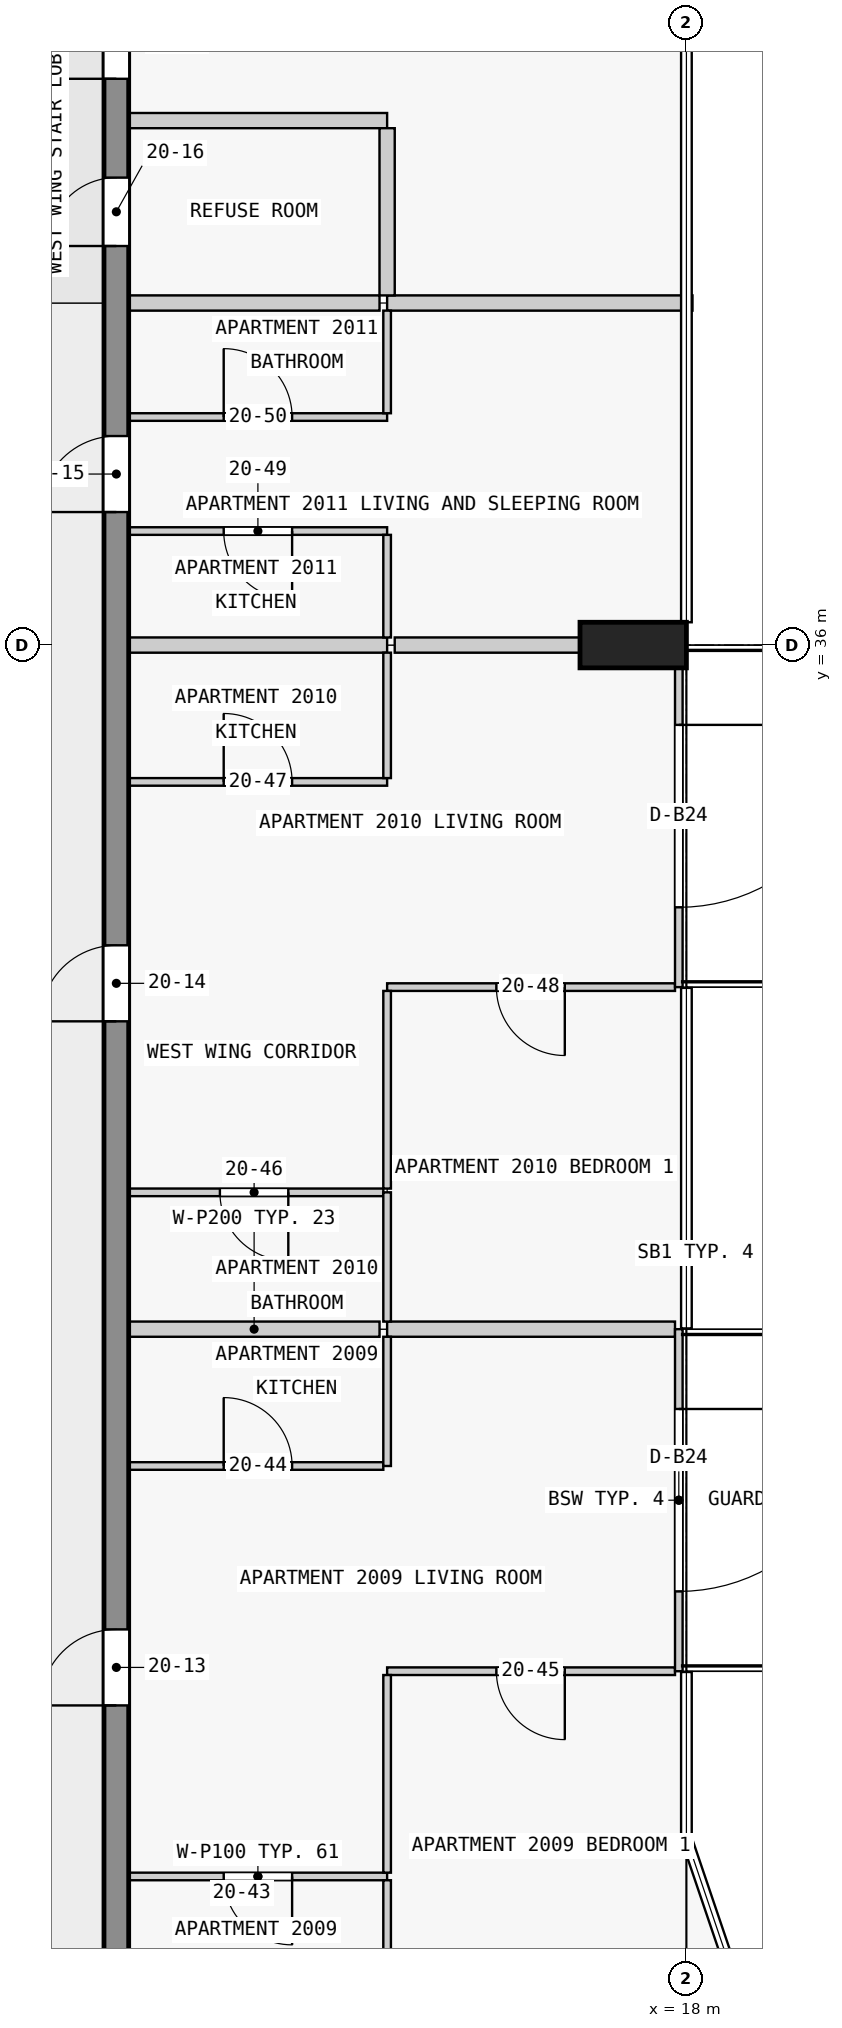
"""IFC4 building model, lengths in metres.
Left out: names, types, materials, properties, quantities, classifications, styles, units other than length and angle.
Written with IfcOpenShell. Run it as: python <this file> out.ifc"""

import sys

from ifc_helpers import new_model, si_unit, direction, frame, frame_2d, origin, origin_2d, place, context, subcontext, project, spatial, rectangle, extrude, element, fill, save


model = new_model("IFC4")
c1 = context("Model", 3, precision=1e-05, world=origin(), true_north=direction((0.0, 1.0)))
c2 = subcontext(c1, "Body", "Model", "MODEL_VIEW")
j1 = project(units=[si_unit("LENGTHUNIT", "METRE"), si_unit("PLANEANGLEUNIT", "RADIAN")], contexts=[c1])
p1 = place(None, origin())
s1 = spatial("IfcSite", under=j1, at=p1, CompositionType="ELEMENT")
p2 = place(p1, origin())
s2 = spatial("IfcBuilding", under=s1, at=p2, CompositionType="ELEMENT")
p3 = place(p2, frame((0.0, 0.0, 81.8)))
s3 = spatial("IfcBuildingStorey", under=s2, at=p3, CompositionType="ELEMENT", Elevation=81.8)
p4 = place(p3, frame((17.3, 36.0, 0.0), z_axis=(0.0, 0.0, 1.0), x_axis=(0.0, 1.0, 0.0)))
e1 = element("IfcColumn", 1, at=p4, inside=s3, PredefinedType="COLUMN", context=c2, shape_type="SweptSolid", body=[
    extrude(rectangle(XDim=0.6, YDim=1.4, at=origin_2d()), origin(), (0.0, 0.0, 1.0), 3.5),
])
p5 = place(p3, frame((10.5, 18.0, 0.0), z_axis=(0.0, 0.0, 1.0), x_axis=(0.0, 1.0, 0.0)))
e2 = element("IfcWall", 2, at=p5, inside=s3, PredefinedType="SHEAR", context=c2, shape_type="SweptSolid", body=[
    extrude(rectangle(XDim=27.0, YDim=0.325, at=frame_2d((13.5, 0.0))), origin(), (0.0, 0.0, 1.0), 3.25),
])
p6 = place(p5, frame((4.05, 0.0, 0.0)))
e3 = element("IfcOpeningElement", 3, at=p6, cuts=e2, PredefinedType="OPENING", context=c2, shape_type="SweptSolid", body=[
    extrude(rectangle(XDim=1.0, YDim=2.1, at=frame_2d((0.5, 1.05))), frame((0.0, 0.172, 0.0), z_axis=(0.0, -1.0, 0.0), x_axis=(1.0, 0.0, 0.0)), (0.0, 0.0, 1.0), 0.345),
])
p7 = place(p5, frame((13.05, 0.0, 0.0)))
e4 = element("IfcOpeningElement", 4, at=p7, cuts=e2, PredefinedType="OPENING", context=c2, shape_type="SweptSolid", body=[
    extrude(rectangle(XDim=1.0, YDim=2.1, at=frame_2d((0.5, 1.05))), frame((0.0, 0.172, 0.0), z_axis=(0.0, -1.0, 0.0), x_axis=(1.0, 0.0, 0.0)), (0.0, 0.0, 1.0), 0.345),
])
p8 = place(p5, frame((19.75, 0.0, 0.0)))
e5 = element("IfcOpeningElement", 5, at=p8, cuts=e2, PredefinedType="OPENING", context=c2, shape_type="SweptSolid", body=[
    extrude(rectangle(XDim=1.0, YDim=2.1, at=frame_2d((0.5, 1.05))), frame((0.0, 0.172, 0.0), z_axis=(0.0, -1.0, 0.0), x_axis=(1.0, 0.0, 0.0)), (0.0, 0.0, 1.0), 0.345),
])
p9 = place(p5, frame((23.25, 0.0, 0.0)))
e6 = element("IfcOpeningElement", 6, at=p9, cuts=e2, PredefinedType="OPENING", context=c2, shape_type="SweptSolid", body=[
    extrude(rectangle(XDim=0.9, YDim=2.1, at=frame_2d((0.45, 1.05))), frame((0.0, 0.172, 0.0), z_axis=(0.0, -1.0, 0.0), x_axis=(1.0, 0.0, 0.0)), (0.0, 0.0, 1.0), 0.345),
])
p10 = place(p5, frame((25.45, 0.0, 0.0)))
e7 = element("IfcOpeningElement", 7, at=p10, cuts=e2, PredefinedType="OPENING", context=c2, shape_type="SweptSolid", body=[
    extrude(rectangle(XDim=1.0, YDim=2.1, at=frame_2d((0.5, 1.05))), frame((0.0, 0.172, 0.0), z_axis=(0.0, -1.0, 0.0), x_axis=(1.0, 0.0, 0.0)), (0.0, 0.0, 1.0), 0.345),
])
p11 = place(p3, frame((17.9, 27.0, 0.0), z_axis=(0.0, 0.0, 1.0), x_axis=(0.0, -1.0, 0.0)))
e8 = element("IfcWall", 8, at=p11, inside=s3, PredefinedType="STANDARD", context=c2, shape_type="SweptSolid", body=[
    extrude(rectangle(XDim=4.5, YDim=0.1, at=frame_2d((2.25, 0.0))), origin(), (0.0, 0.0, 1.0), 3.25),
])
p12 = place(p11, frame((1.05, 0.0, 0.0)))
e9 = element("IfcOpeningElement", 9, at=p12, cuts=e8, PredefinedType="OPENING", context=c2, shape_type="SweptSolid", body=[
    extrude(rectangle(XDim=2.4, YDim=2.4, at=frame_2d((1.2, 1.2))), frame((0.0, 0.06, 0.0), z_axis=(0.0, -1.0, 0.0), x_axis=(1.0, 0.0, 0.0)), (0.0, 0.0, 1.0), 0.12),
])
p13 = place(p3, frame((17.9, 36.0, 0.0), z_axis=(0.0, 0.0, 1.0), x_axis=(0.0, -1.0, 0.0)))
e10 = element("IfcWall", 10, at=p13, inside=s3, PredefinedType="STANDARD", context=c2, shape_type="SweptSolid", body=[
    extrude(rectangle(XDim=4.5, YDim=0.1, at=frame_2d((2.25, 0.0))), origin(), (0.0, 0.0, 1.0), 3.25),
])
p14 = place(p13, frame((1.05, 0.0, 0.0)))
e11 = element("IfcOpeningElement", 11, at=p14, cuts=e10, PredefinedType="OPENING", context=c2, shape_type="SweptSolid", body=[
    extrude(rectangle(XDim=2.4, YDim=2.4, at=frame_2d((1.2, 1.2))), frame((0.0, 0.06, 0.0), z_axis=(0.0, -1.0, 0.0), x_axis=(1.0, 0.0, 0.0)), (0.0, 0.0, 1.0), 0.12),
])
p15 = place(p3, frame((14.062, 19.8, 0.0), z_axis=(0.0, 0.0, 1.0), x_axis=(-1.0, 0.0, 0.0)))
e12 = element("IfcWall", 12, at=p15, inside=s3, PredefinedType="PARTITIONING", context=c2, shape_type="SweptSolid", body=[
    extrude(rectangle(XDim=3.4, YDim=0.1, at=frame_2d((1.7, 0.0))), origin(), (0.0, 0.0, 1.0), 3.25),
])
p16 = place(p15, frame((1.25, 0.0, 0.0)))
e13 = element("IfcOpeningElement", 13, at=p16, cuts=e12, PredefinedType="OPENING", context=c2, shape_type="SweptSolid", body=[
    extrude(rectangle(XDim=0.9, YDim=2.1, at=frame_2d((0.45, 1.05))), frame((0.0, 0.06, 0.0), z_axis=(0.0, -1.0, 0.0), x_axis=(1.0, 0.0, 0.0)), (0.0, 0.0, 1.0), 0.12),
])
p17 = place(p3, frame((17.85, 22.5, 0.0), z_axis=(0.0, 0.0, 1.0), x_axis=(-1.0, 0.0, 0.0)))
e14 = element("IfcWall", 14, at=p17, inside=s3, PredefinedType="PARTITIONING", context=c2, shape_type="SweptSolid", body=[
    extrude(rectangle(XDim=3.788, YDim=0.1, at=frame_2d((1.894, 0.0))), origin(), (0.0, 0.0, 1.0), 3.25),
])
p18 = place(p17, frame((1.45, 0.0, 0.0)))
e15 = element("IfcOpeningElement", 15, at=p18, cuts=e14, PredefinedType="OPENING", context=c2, shape_type="SweptSolid", body=[
    extrude(rectangle(XDim=0.9, YDim=2.1, at=frame_2d((0.45, 1.05))), frame((0.0, 0.06, 0.0), z_axis=(0.0, -1.0, 0.0), x_axis=(1.0, 0.0, 0.0)), (0.0, 0.0, 1.0), 0.12),
])
p19 = place(p3, frame((10.663, 25.2, 0.0), z_axis=(0.0, 0.0, 1.0), x_axis=(1.0, 0.0, 0.0)))
e16 = element("IfcWall", 16, at=p19, inside=s3, PredefinedType="PARTITIONING", context=c2, shape_type="SweptSolid", body=[
    extrude(rectangle(XDim=3.35, YDim=0.1, at=frame_2d((1.675, 0.0))), origin(), (0.0, 0.0, 1.0), 3.25),
])
p20 = place(p19, frame((1.25, 0.0, 0.0)))
e17 = element("IfcOpeningElement", 17, at=p20, cuts=e16, PredefinedType="OPENING", context=c2, shape_type="SweptSolid", body=[
    extrude(rectangle(XDim=0.9, YDim=2.1, at=frame_2d((0.45, 1.05))), frame((0.0, 0.06, 0.0), z_axis=(0.0, -1.0, 0.0), x_axis=(1.0, 0.0, 0.0)), (0.0, 0.0, 1.0), 0.12),
])
p21 = place(p3, frame((13.962, 27.0, 0.0), z_axis=(0.0, 0.0, 1.0), x_axis=(-1.0, 0.0, 0.0)))
e18 = element("IfcWall", 18, at=p21, inside=s3, PredefinedType="PARTITIONING", context=c2, shape_type="SweptSolid", body=[
    extrude(rectangle(XDim=3.3, YDim=0.2, at=frame_2d((1.65, 0.0))), origin(), (0.0, 0.0, 1.0), 3.25),
])
p22 = place(p3, frame((14.062, 27.0, 0.0), z_axis=(0.0, 0.0, 1.0), x_axis=(1.0, 0.0, 0.0)))
e19 = element("IfcWall", 19, at=p22, inside=s3, PredefinedType="PARTITIONING", context=c2, shape_type="SweptSolid", body=[
    extrude(rectangle(XDim=3.788, YDim=0.2, at=frame_2d((1.894, 0.0))), origin(), (0.0, 0.0, 1.0), 3.25),
])
p23 = place(p3, frame((14.012, 28.8, 0.0), z_axis=(0.0, 0.0, 1.0), x_axis=(-1.0, 0.0, 0.0)))
e20 = element("IfcWall", 20, at=p23, inside=s3, PredefinedType="PARTITIONING", context=c2, shape_type="SweptSolid", body=[
    extrude(rectangle(XDim=3.35, YDim=0.1, at=frame_2d((1.675, 0.0))), origin(), (0.0, 0.0, 1.0), 3.25),
])
p24 = place(p23, frame((1.25, 0.0, 0.0)))
e21 = element("IfcOpeningElement", 21, at=p24, cuts=e20, PredefinedType="OPENING", context=c2, shape_type="SweptSolid", body=[
    extrude(rectangle(XDim=0.9, YDim=2.1, at=frame_2d((0.45, 1.05))), frame((0.0, 0.06, 0.0), z_axis=(0.0, -1.0, 0.0), x_axis=(1.0, 0.0, 0.0)), (0.0, 0.0, 1.0), 0.12),
])
p25 = place(p3, frame((17.85, 31.5, 0.0), z_axis=(0.0, 0.0, 1.0), x_axis=(-1.0, 0.0, 0.0)))
e22 = element("IfcWall", 22, at=p25, inside=s3, PredefinedType="PARTITIONING", context=c2, shape_type="SweptSolid", body=[
    extrude(rectangle(XDim=3.788, YDim=0.1, at=frame_2d((1.894, 0.0))), origin(), (0.0, 0.0, 1.0), 3.25),
])
p26 = place(p25, frame((1.45, 0.0, 0.0)))
e23 = element("IfcOpeningElement", 23, at=p26, cuts=e22, PredefinedType="OPENING", context=c2, shape_type="SweptSolid", body=[
    extrude(rectangle(XDim=0.9, YDim=2.1, at=frame_2d((0.45, 1.05))), frame((0.0, 0.06, 0.0), z_axis=(0.0, -1.0, 0.0), x_axis=(1.0, 0.0, 0.0)), (0.0, 0.0, 1.0), 0.12),
])
p27 = place(p3, frame((10.663, 34.2, 0.0), z_axis=(0.0, 0.0, 1.0), x_axis=(1.0, 0.0, 0.0)))
e24 = element("IfcWall", 24, at=p27, inside=s3, PredefinedType="PARTITIONING", context=c2, shape_type="SweptSolid", body=[
    extrude(rectangle(XDim=3.4, YDim=0.1, at=frame_2d((1.7, 0.0))), origin(), (0.0, 0.0, 1.0), 3.25),
])
p28 = place(p27, frame((1.25, 0.0, 0.0)))
e25 = element("IfcOpeningElement", 25, at=p28, cuts=e24, PredefinedType="OPENING", context=c2, shape_type="SweptSolid", body=[
    extrude(rectangle(XDim=0.9, YDim=2.1, at=frame_2d((0.45, 1.05))), frame((0.0, 0.06, 0.0), z_axis=(0.0, -1.0, 0.0), x_axis=(1.0, 0.0, 0.0)), (0.0, 0.0, 1.0), 0.12),
])
p29 = place(p3, frame((14.062, 36.0, 0.0), z_axis=(0.0, 0.0, 1.0), x_axis=(-1.0, 0.0, 0.0)))
e26 = element("IfcWall", 26, at=p29, inside=s3, PredefinedType="PARTITIONING", context=c2, shape_type="SweptSolid", body=[
    extrude(rectangle(XDim=3.4, YDim=0.2, at=frame_2d((1.7, 0.0))), origin(), (0.0, 0.0, 1.0), 3.25),
])
p30 = place(p3, frame((14.163, 36.0, 0.0), z_axis=(0.0, 0.0, 1.0), x_axis=(1.0, 0.0, 0.0)))
e27 = element("IfcWall", 27, at=p30, inside=s3, PredefinedType="PARTITIONING", context=c2, shape_type="SweptSolid", body=[
    extrude(rectangle(XDim=2.438, YDim=0.2, at=frame_2d((1.219, 0.0))), origin(), (0.0, 0.0, 1.0), 3.25),
])
p31 = place(p3, frame((14.062, 37.5, 0.0), z_axis=(0.0, 0.0, 1.0), x_axis=(-1.0, 0.0, 0.0)))
e28 = element("IfcWall", 28, at=p31, inside=s3, PredefinedType="PARTITIONING", context=c2, shape_type="SweptSolid", body=[
    extrude(rectangle(XDim=3.4, YDim=0.1, at=frame_2d((1.7, 0.0))), origin(), (0.0, 0.0, 1.0), 3.25),
])
p32 = place(p31, frame((1.25, 0.0, 0.0)))
e29 = element("IfcOpeningElement", 29, at=p32, cuts=e28, PredefinedType="OPENING", context=c2, shape_type="SweptSolid", body=[
    extrude(rectangle(XDim=0.9, YDim=2.1, at=frame_2d((0.45, 1.05))), frame((0.0, 0.06, 0.0), z_axis=(0.0, -1.0, 0.0), x_axis=(1.0, 0.0, 0.0)), (0.0, 0.0, 1.0), 0.12),
])
p33 = place(p3, frame((10.663, 39.0, 0.0), z_axis=(0.0, 0.0, 1.0), x_axis=(1.0, 0.0, 0.0)))
e30 = element("IfcWall", 30, at=p33, inside=s3, PredefinedType="PARTITIONING", context=c2, shape_type="SweptSolid", body=[
    extrude(rectangle(XDim=3.4, YDim=0.1, at=frame_2d((1.7, 0.0))), origin(), (0.0, 0.0, 1.0), 3.25),
])
p34 = place(p33, frame((1.25, 0.0, 0.0)))
e31 = element("IfcOpeningElement", 31, at=p34, cuts=e30, PredefinedType="OPENING", context=c2, shape_type="SweptSolid", body=[
    extrude(rectangle(XDim=0.9, YDim=2.1, at=frame_2d((0.45, 1.05))), frame((0.0, 0.06, 0.0), z_axis=(0.0, -1.0, 0.0), x_axis=(1.0, 0.0, 0.0)), (0.0, 0.0, 1.0), 0.12),
])
p35 = place(p3, frame((13.962, 40.5, 0.0), z_axis=(0.0, 0.0, 1.0), x_axis=(-1.0, 0.0, 0.0)))
e32 = element("IfcWall", 32, at=p35, inside=s3, PredefinedType="PARTITIONING", context=c2, shape_type="SweptSolid", body=[
    extrude(rectangle(XDim=3.3, YDim=0.2, at=frame_2d((1.65, 0.0))), origin(), (0.0, 0.0, 1.0), 3.25),
])
p36 = place(p3, frame((14.062, 40.5, 0.0), z_axis=(0.0, 0.0, 1.0), x_axis=(1.0, 0.0, 0.0)))
e33 = element("IfcWall", 33, at=p36, inside=s3, PredefinedType="PARTITIONING", context=c2, shape_type="SweptSolid", body=[
    extrude(rectangle(XDim=4.018, YDim=0.2, at=frame_2d((2.009, 0.0))), origin(), (0.0, 0.0, 1.0), 3.25),
])
p37 = place(p3, frame((14.062, 42.9, 0.0), z_axis=(0.0, 0.0, 1.0), x_axis=(-1.0, 0.0, 0.0)))
e34 = element("IfcWall", 34, at=p37, inside=s3, PredefinedType="PARTITIONING", context=c2, shape_type="SweptSolid", body=[
    extrude(rectangle(XDim=3.4, YDim=0.2, at=frame_2d((1.7, 0.0))), origin(), (0.0, 0.0, 1.0), 3.25),
])
for number, where, z_axis, x_axis in (
    (35, (14.062, 22.45, 0.0), (0.0, 0.0, 1.0), (0.0, -1.0, 0.0)),
    (36, (14.062, 31.45, 0.0), (0.0, 0.0, 1.0), (0.0, -1.0, 0.0)),
):
    element("IfcWall", number, at=place(p3, frame(where, z_axis=z_axis, x_axis=x_axis)), inside=s3, PredefinedType="PARTITIONING", context=c2, shape_type="SweptSolid", body=[
        extrude(rectangle(XDim=2.6, YDim=0.1, at=frame_2d((1.3, 0.0))), origin(), (0.0, 0.0, 1.0), 3.25),
    ])
p38 = place(p3, frame((14.062, 18.0, 0.0), z_axis=(0.0, 0.0, 1.0), x_axis=(0.0, 1.0, 0.0)))
e37 = element("IfcWall", 37, at=p38, inside=s3, PredefinedType="PARTITIONING", context=c2, shape_type="SweptSolid", body=[
    extrude(rectangle(XDim=1.75, YDim=0.1, at=frame_2d((0.875, 0.0))), origin(), (0.0, 0.0, 1.0), 3.25),
])
for number, where, z_axis, x_axis in (
    (38, (14.062, 25.2, 0.0), (0.0, 0.0, 1.0), (0.0, 1.0, 0.0)),
    (39, (14.062, 27.1, 0.0), (0.0, 0.0, 1.0), (0.0, 1.0, 0.0)),
):
    element("IfcWall", number, at=place(p3, frame(where, z_axis=z_axis, x_axis=x_axis)), inside=s3, PredefinedType="PARTITIONING", context=c2, shape_type="SweptSolid", body=[
        extrude(rectangle(XDim=1.7, YDim=0.1, at=frame_2d((0.85, 0.0))), origin(), (0.0, 0.0, 1.0), 3.25),
    ])
p39 = place(p3, frame((14.062, 34.25, 0.0), z_axis=(0.0, 0.0, 1.0), x_axis=(0.0, 1.0, 0.0)))
e40 = element("IfcWall", 40, at=p39, inside=s3, PredefinedType="PARTITIONING", context=c2, shape_type="SweptSolid", body=[
    extrude(rectangle(XDim=1.65, YDim=0.1, at=frame_2d((0.825, 0.0))), origin(), (0.0, 0.0, 1.0), 3.25),
])
for number, where, z_axis, x_axis in (
    (41, (14.062, 36.1, 0.0), (0.0, 0.0, 1.0), (0.0, 1.0, 0.0)),
    (42, (14.062, 39.05, 0.0), (0.0, 0.0, 1.0), (0.0, 1.0, 0.0)),
):
    element("IfcWall", number, at=place(p3, frame(where, z_axis=z_axis, x_axis=x_axis)), inside=s3, PredefinedType="PARTITIONING", context=c2, shape_type="SweptSolid", body=[
        extrude(rectangle(XDim=1.35, YDim=0.1, at=frame_2d((0.675, 0.0))), origin(), (0.0, 0.0, 1.0), 3.25),
    ])
p40 = place(p3, frame((14.062, 40.6, 0.0), z_axis=(0.0, 0.0, 1.0), x_axis=(0.0, 1.0, 0.0)))
e43 = element("IfcWall", 43, at=p40, inside=s3, PredefinedType="PARTITIONING", context=c2, shape_type="SweptSolid", body=[
    extrude(rectangle(XDim=2.2, YDim=0.2, at=frame_2d((1.1, 0.0))), origin(), (0.0, 0.0, 1.0), 3.25),
])
p41 = place(p12, origin())
e44 = element("IfcDoor", 44, at=p41, inside=s3, OperationType="SINGLE_SWING_LEFT", PredefinedType="DOOR", context=c2, shape_type="SweptSolid", body=[
    extrude(rectangle(XDim=2.4, YDim=2.4, at=frame_2d((1.2, 1.2))), frame((0.0, 0.025, 0.0), z_axis=(0.0, -1.0, 0.0), x_axis=(1.0, 0.0, 0.0)), (0.0, 0.0, 1.0), 0.05),
])
fill(e9, e44)
p42 = place(p14, origin())
e45 = element("IfcDoor", 45, at=p42, inside=s3, OperationType="SINGLE_SWING_LEFT", PredefinedType="DOOR", context=c2, shape_type="SweptSolid", body=[
    extrude(rectangle(XDim=2.4, YDim=2.4, at=frame_2d((1.2, 1.2))), frame((0.0, 0.025, 0.0), z_axis=(0.0, -1.0, 0.0), x_axis=(1.0, 0.0, 0.0)), (0.0, 0.0, 1.0), 0.05),
])
fill(e11, e45)
p43 = place(p6, origin())
e46 = element("IfcDoor", 46, at=p43, inside=s3, OperationType="SINGLE_SWING_LEFT", PredefinedType="DOOR", context=c2, shape_type="SweptSolid", body=[
    extrude(rectangle(XDim=1.0, YDim=2.1, at=frame_2d((0.5, 1.05))), frame((0.0, 0.025, 0.0), z_axis=(0.0, -1.0, 0.0), x_axis=(1.0, 0.0, 0.0)), (0.0, 0.0, 1.0), 0.05),
])
fill(e3, e46)
p44 = place(p7, origin())
e47 = element("IfcDoor", 47, at=p44, inside=s3, OperationType="SINGLE_SWING_RIGHT", PredefinedType="DOOR", context=c2, shape_type="SweptSolid", body=[
    extrude(rectangle(XDim=1.0, YDim=2.1, at=frame_2d((0.5, 1.05))), frame((0.0, 0.025, 0.0), z_axis=(0.0, -1.0, 0.0), x_axis=(1.0, 0.0, 0.0)), (0.0, 0.0, 1.0), 0.05),
])
fill(e4, e47)
p45 = place(p8, origin())
e48 = element("IfcDoor", 48, at=p45, inside=s3, OperationType="SINGLE_SWING_RIGHT", PredefinedType="DOOR", context=c2, shape_type="SweptSolid", body=[
    extrude(rectangle(XDim=1.0, YDim=2.1, at=frame_2d((0.5, 1.05))), frame((0.0, 0.025, 0.0), z_axis=(0.0, -1.0, 0.0), x_axis=(1.0, 0.0, 0.0)), (0.0, 0.0, 1.0), 0.05),
])
fill(e5, e48)
p46 = place(p9, origin())
e49 = element("IfcDoor", 49, at=p46, inside=s3, OperationType="SINGLE_SWING_RIGHT", PredefinedType="DOOR", context=c2, shape_type="SweptSolid", body=[
    extrude(rectangle(XDim=0.9, YDim=2.1, at=frame_2d((0.45, 1.05))), frame((0.0, 0.025, 0.0), z_axis=(0.0, -1.0, 0.0), x_axis=(1.0, 0.0, 0.0)), (0.0, 0.0, 1.0), 0.05),
])
fill(e6, e49)
p47 = place(p10, origin())
e50 = element("IfcDoor", 50, at=p47, inside=s3, OperationType="SINGLE_SWING_RIGHT", PredefinedType="DOOR", context=c2, shape_type="SweptSolid", body=[
    extrude(rectangle(XDim=1.0, YDim=2.1, at=frame_2d((0.5, 1.05))), frame((0.0, 0.025, 0.0), z_axis=(0.0, -1.0, 0.0), x_axis=(1.0, 0.0, 0.0)), (0.0, 0.0, 1.0), 0.05),
])
fill(e7, e50)
p48 = place(p16, origin())
e51 = element("IfcDoor", 51, at=p48, inside=s3, OperationType="SINGLE_SWING_LEFT", PredefinedType="DOOR", context=c2, shape_type="SweptSolid", body=[
    extrude(rectangle(XDim=0.9, YDim=2.1, at=frame_2d((0.45, 1.05))), frame((0.0, 0.025, 0.0), z_axis=(0.0, -1.0, 0.0), x_axis=(1.0, 0.0, 0.0)), (0.0, 0.0, 1.0), 0.05),
])
fill(e13, e51)
p49 = place(p20, origin())
e52 = element("IfcDoor", 52, at=p49, inside=s3, OperationType="SINGLE_SWING_RIGHT", PredefinedType="DOOR", context=c2, shape_type="SweptSolid", body=[
    extrude(rectangle(XDim=0.9, YDim=2.1, at=frame_2d((0.45, 1.05))), frame((0.0, 0.025, 0.0), z_axis=(0.0, -1.0, 0.0), x_axis=(1.0, 0.0, 0.0)), (0.0, 0.0, 1.0), 0.05),
])
fill(e17, e52)
p50 = place(p18, origin())
e53 = element("IfcDoor", 53, at=p50, inside=s3, OperationType="SINGLE_SWING_RIGHT", PredefinedType="DOOR", context=c2, shape_type="SweptSolid", body=[
    extrude(rectangle(XDim=0.9, YDim=2.1, at=frame_2d((0.45, 1.05))), frame((0.0, 0.025, 0.0), z_axis=(0.0, -1.0, 0.0), x_axis=(1.0, 0.0, 0.0)), (0.0, 0.0, 1.0), 0.05),
])
fill(e15, e53)
p51 = place(p24, origin())
e54 = element("IfcDoor", 54, at=p51, inside=s3, OperationType="SINGLE_SWING_RIGHT", PredefinedType="DOOR", context=c2, shape_type="SweptSolid", body=[
    extrude(rectangle(XDim=0.9, YDim=2.1, at=frame_2d((0.45, 1.05))), frame((0.0, 0.025, 0.0), z_axis=(0.0, -1.0, 0.0), x_axis=(1.0, 0.0, 0.0)), (0.0, 0.0, 1.0), 0.05),
])
fill(e21, e54)
p52 = place(p28, origin())
e55 = element("IfcDoor", 55, at=p52, inside=s3, OperationType="SINGLE_SWING_LEFT", PredefinedType="DOOR", context=c2, shape_type="SweptSolid", body=[
    extrude(rectangle(XDim=0.9, YDim=2.1, at=frame_2d((0.45, 1.05))), frame((0.0, 0.025, 0.0), z_axis=(0.0, -1.0, 0.0), x_axis=(1.0, 0.0, 0.0)), (0.0, 0.0, 1.0), 0.05),
])
fill(e25, e55)
p53 = place(p26, origin())
e56 = element("IfcDoor", 56, at=p53, inside=s3, OperationType="SINGLE_SWING_RIGHT", PredefinedType="DOOR", context=c2, shape_type="SweptSolid", body=[
    extrude(rectangle(XDim=0.9, YDim=2.1, at=frame_2d((0.45, 1.05))), frame((0.0, 0.025, 0.0), z_axis=(0.0, -1.0, 0.0), x_axis=(1.0, 0.0, 0.0)), (0.0, 0.0, 1.0), 0.05),
])
fill(e23, e56)
p54 = place(p32, origin())
e57 = element("IfcDoor", 57, at=p54, inside=s3, OperationType="SINGLE_SWING_LEFT", PredefinedType="DOOR", context=c2, shape_type="SweptSolid", body=[
    extrude(rectangle(XDim=0.9, YDim=2.1, at=frame_2d((0.45, 1.05))), frame((0.0, 0.025, 0.0), z_axis=(0.0, -1.0, 0.0), x_axis=(1.0, 0.0, 0.0)), (0.0, 0.0, 1.0), 0.05),
])
fill(e29, e57)
p55 = place(p34, origin())
e58 = element("IfcDoor", 58, at=p55, inside=s3, OperationType="SINGLE_SWING_LEFT", PredefinedType="DOOR", context=c2, shape_type="SweptSolid", body=[
    extrude(rectangle(XDim=0.9, YDim=2.1, at=frame_2d((0.45, 1.05))), frame((0.0, 0.025, 0.0), z_axis=(0.0, -1.0, 0.0), x_axis=(1.0, 0.0, 0.0)), (0.0, 0.0, 1.0), 0.05),
])
fill(e31, e58)
save(model, sys.argv[1])
